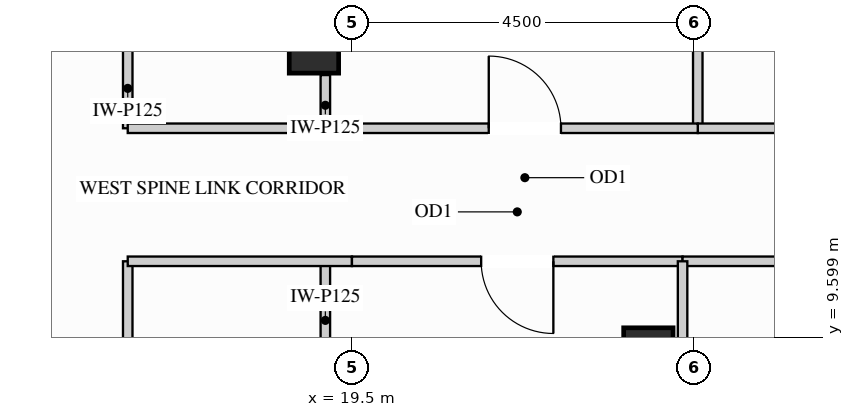
"""IFC4 building model, lengths in metres.
Left out: names, types, materials, properties, quantities, classifications, styles, units other than length and angle.
Written with IfcOpenShell. Run it as: python <this file> out.ifc"""

import sys

from ifc_helpers import new_model, si_unit, direction, frame, frame_2d, origin, origin_2d, place, context, subcontext, project, spatial, rectangle, extrude, source, transform, mapped, element, fill, save


model = new_model("IFC4")
c1 = context("Model", 3, precision=1e-05, world=origin(), true_north=direction((0.0, 1.0)))
c2 = subcontext(c1, "Body", "Model", "MODEL_VIEW")
j1 = project(units=[si_unit("LENGTHUNIT", "METRE"), si_unit("PLANEANGLEUNIT", "RADIAN")], contexts=[c1])
p1 = place(None, origin())
s1 = spatial("IfcSite", under=j1, at=p1, CompositionType="ELEMENT")
p2 = place(p1, origin())
s2 = spatial("IfcBuilding", under=s1, at=p2, CompositionType="ELEMENT")
p3 = place(p2, frame((0.0, 0.0, 219.6)))
s3 = spatial("IfcBuildingStorey", under=s2, at=p3, CompositionType="ELEMENT", Elevation=219.6)
m1 = source(origin(), c2, "Body", "SweptSolid", [
    extrude(rectangle(XDim=0.65, YDim=0.85, at=origin_2d()), origin(), (0.0, 0.0, 1.0), 3.4),
])
for number, where, z_axis, x_axis in (
    (1, (19.0, 13.5, 0.0), (0.0, 0.0, 1.0), (1.0, 0.0, 0.0)),
    (2, (23.4, 9.3, 0.0), (0.0, 0.0, 1.0), (1.0, 0.0, 0.0)),
):
    element("IfcColumn", number, at=place(p3, frame(where, z_axis=z_axis, x_axis=x_axis)), inside=s3, PredefinedType="COLUMN", context=c2, shape_type="MappedRepresentation", body=[
        mapped(m1, transform((0.0, 0.0, 0.0), x_axis=(1.0, 0.0, 0.0), y_axis=(0.0, 1.0, 0.0), z_axis=(0.0, 0.0, 1.0))),
    ])
m2 = source(origin(), c2, "Body", "SweptSolid", [
    extrude(rectangle(XDim=0.7, YDim=0.125, at=frame_2d((0.35, 0.0))), origin(), (0.0, 0.0, 1.0), 2.773),
])
p4 = place(p3, frame((19.15, 12.35, 0.0), z_axis=(0.0, 0.0, 1.0), x_axis=(0.0, 1.0, 0.0)))
e3 = element("IfcWall", 3, at=p4, inside=s3, PredefinedType="PARTITIONING", context=c2, shape_type="MappedRepresentation", body=[
    mapped(m2, transform((0.0, 0.0, 0.0), x_axis=(1.0, 0.0, 0.0), y_axis=(0.0, 1.0, 0.0), z_axis=(0.0, 0.0, 1.0))),
])
m3 = source(origin(), c2, "Body", "SweptSolid", [
    extrude(rectangle(XDim=1.65, YDim=0.125, at=frame_2d((0.825, 0.0))), origin(), (0.0, 0.0, 1.0), 2.773),
])
p5 = place(p3, frame((19.15, 8.95, 0.0), z_axis=(0.0, 0.0, 1.0), x_axis=(0.0, 1.0, 0.0)))
e4 = element("IfcWall", 4, at=p5, inside=s3, PredefinedType="PARTITIONING", context=c2, shape_type="MappedRepresentation", body=[
    mapped(m3, transform((0.0, 0.0, 0.0), x_axis=(1.0, 0.0, 0.0), y_axis=(0.0, 1.0, 0.0), z_axis=(0.0, 0.0, 1.0))),
])
p6 = place(p3, frame((16.55, 12.35, 0.0), z_axis=(0.0, 0.0, 1.0), x_axis=(0.0, 1.0, 0.0)))
e5 = element("IfcWall", 5, at=p6, inside=s3, PredefinedType="PARTITIONING", context=c2, shape_type="SweptSolid", body=[
    extrude(rectangle(XDim=3.25, YDim=0.125, at=frame_2d((1.625, 0.0))), origin(), (0.0, 0.0, 1.0), 3.385),
])
p7 = place(p6, frame((1.15, 0.0, 0.0)))
e6 = element("IfcOpeningElement", 6, at=p7, cuts=e5, PredefinedType="OPENING", context=c2, shape_type="SweptSolid", body=[
    extrude(rectangle(XDim=0.95, YDim=2.15, at=frame_2d((0.475, 1.075))), frame((0.0, 0.073, 0.0), z_axis=(0.0, -1.0, 0.0), x_axis=(1.0, 0.0, 0.0)), (0.0, 0.0, 1.0), 0.145),
])
p8 = place(p3, frame((16.55, 6.2, 0.0), z_axis=(0.0, 0.0, 1.0), x_axis=(0.0, 1.0, 0.0)))
e7 = element("IfcWall", 7, at=p8, inside=s3, PredefinedType="PARTITIONING", context=c2, shape_type="SweptSolid", body=[
    extrude(rectangle(XDim=4.4, YDim=0.125, at=frame_2d((2.2, 0.0))), origin(), (0.0, 0.0, 1.0), 3.385),
])
p9 = place(p8, frame((1.725, 0.0, 0.0)))
e8 = element("IfcOpeningElement", 8, at=p9, cuts=e7, PredefinedType="OPENING", context=c2, shape_type="SweptSolid", body=[
    extrude(rectangle(XDim=0.95, YDim=2.15, at=frame_2d((0.475, 1.075))), frame((0.0, 0.073, 0.0), z_axis=(0.0, -1.0, 0.0), x_axis=(1.0, 0.0, 0.0)), (0.0, 0.0, 1.0), 0.145),
])
m4 = source(origin(), c2, "Body", "SweptSolid", [
    extrude(rectangle(XDim=5.298, YDim=0.125, at=frame_2d((2.649, 0.0))), origin(), (0.0, 0.0, 1.0), 3.385),
])
p10 = place(p3, frame((24.05, 12.35, 0.0), z_axis=(0.0, 0.0, 1.0), x_axis=(0.0, 1.0, 0.0)))
e9 = element("IfcWall", 9, at=p10, inside=s3, PredefinedType="PARTITIONING", context=c2, shape_type="MappedRepresentation", body=[
    mapped(m4, transform((0.0, 0.0, 0.0), x_axis=(1.0, 0.0, 0.0), y_axis=(0.0, 1.0, 0.0), z_axis=(0.0, 0.0, 1.0))),
])
p11 = place(p3, frame((24.05, 12.35, 0.0), z_axis=(0.0, 0.0, 1.0), x_axis=(1.0, 0.0, 0.0)))
e10 = element("IfcWall", 10, at=p11, inside=s3, PredefinedType="PARTITIONING", context=c2, shape_type="SweptSolid", body=[
    extrude(rectangle(XDim=5.8, YDim=0.125, at=frame_2d((2.9, 0.0))), origin(), (0.0, 0.0, 1.0), 3.385),
])
p12 = place(p11, frame((2.425, 0.0, 0.0)))
e11 = element("IfcOpeningElement", 11, at=p12, cuts=e10, PredefinedType="OPENING", context=c2, shape_type="SweptSolid", body=[
    extrude(rectangle(XDim=0.95, YDim=2.15, at=frame_2d((0.475, 1.075))), frame((0.0, 0.073, 0.0), z_axis=(0.0, -1.0, 0.0), x_axis=(1.0, 0.0, 0.0)), (0.0, 0.0, 1.0), 0.145),
])
m5 = source(origin(), c2, "Body", "SweptSolid", [
    extrude(rectangle(XDim=2.95, YDim=0.125, at=frame_2d((1.475, 0.0))), origin(), (0.0, 0.0, 1.0), 3.385),
])
p13 = place(p3, frame((16.55, 12.35, 0.0), z_axis=(0.0, 0.0, 1.0), x_axis=(1.0, 0.0, 0.0)))
e12 = element("IfcWall", 12, at=p13, inside=s3, PredefinedType="PARTITIONING", context=c2, shape_type="MappedRepresentation", body=[
    mapped(m5, transform((0.0, 0.0, 0.0), x_axis=(1.0, 0.0, 0.0), y_axis=(0.0, 1.0, 0.0), z_axis=(0.0, 0.0, 1.0))),
])
p14 = place(p3, frame((19.5, 12.35, 0.0), z_axis=(0.0, 0.0, 1.0), x_axis=(1.0, 0.0, 0.0)))
e13 = element("IfcWall", 13, at=p14, inside=s3, PredefinedType="PARTITIONING", context=c2, shape_type="SweptSolid", body=[
    extrude(rectangle(XDim=4.55, YDim=0.125, at=frame_2d((2.275, 0.0))), origin(), (0.0, 0.0, 1.0), 3.385),
])
p15 = place(p14, frame((1.8, 0.0, 0.0)))
e14 = element("IfcOpeningElement", 14, at=p15, cuts=e13, PredefinedType="OPENING", context=c2, shape_type="SweptSolid", body=[
    extrude(rectangle(XDim=0.95, YDim=2.15, at=frame_2d((0.475, 1.075))), frame((0.0, 0.073, 0.0), z_axis=(0.0, -1.0, 0.0), x_axis=(1.0, 0.0, 0.0)), (0.0, 0.0, 1.0), 0.145),
])
p16 = place(p3, frame((16.55, 10.6, 0.0), z_axis=(0.0, 0.0, 1.0), x_axis=(1.0, 0.0, 0.0)))
e15 = element("IfcWall", 15, at=p16, inside=s3, PredefinedType="PARTITIONING", context=c2, shape_type="MappedRepresentation", body=[
    mapped(m5, transform((0.0, 0.0, 0.0), x_axis=(1.0, 0.0, 0.0), y_axis=(0.0, 1.0, 0.0), z_axis=(0.0, 0.0, 1.0))),
])
p17 = place(p3, frame((19.5, 10.6, 0.0), z_axis=(0.0, 0.0, 1.0), x_axis=(1.0, 0.0, 0.0)))
e16 = element("IfcWall", 16, at=p17, inside=s3, PredefinedType="PARTITIONING", context=c2, shape_type="SweptSolid", body=[
    extrude(rectangle(XDim=4.35, YDim=0.125, at=frame_2d((2.175, 0.0))), origin(), (0.0, 0.0, 1.0), 3.385),
])
p18 = place(p17, frame((1.7, 0.0, 0.0)))
e17 = element("IfcOpeningElement", 17, at=p18, cuts=e16, PredefinedType="OPENING", context=c2, shape_type="SweptSolid", body=[
    extrude(rectangle(XDim=0.95, YDim=2.15, at=frame_2d((0.475, 1.075))), frame((0.0, 0.073, 0.0), z_axis=(0.0, -1.0, 0.0), x_axis=(1.0, 0.0, 0.0)), (0.0, 0.0, 1.0), 0.145),
])
p19 = place(p3, frame((23.85, 10.6, 0.0), z_axis=(0.0, 0.0, 1.0), x_axis=(1.0, 0.0, 0.0)))
e18 = element("IfcWall", 18, at=p19, inside=s3, PredefinedType="PARTITIONING", context=c2, shape_type="SweptSolid", body=[
    extrude(rectangle(XDim=6.0, YDim=0.125, at=frame_2d((3.0, 0.0))), origin(), (0.0, 0.0, 1.0), 3.385),
])
p20 = place(p19, frame((2.525, 0.0, 0.0)))
e19 = element("IfcOpeningElement", 19, at=p20, cuts=e18, PredefinedType="OPENING", context=c2, shape_type="SweptSolid", body=[
    extrude(rectangle(XDim=0.95, YDim=2.15, at=frame_2d((0.475, 1.075))), frame((0.0, 0.073, 0.0), z_axis=(0.0, -1.0, 0.0), x_axis=(1.0, 0.0, 0.0)), (0.0, 0.0, 1.0), 0.145),
])
m6 = source(origin(), c2, "Body", "SweptSolid", [
    extrude(rectangle(XDim=5.748, YDim=0.125, at=frame_2d((2.874, 0.0))), origin(), (0.0, 0.0, 1.0), 3.385),
])
p21 = place(p3, frame((23.85, 4.852, 0.0), z_axis=(0.0, 0.0, 1.0), x_axis=(0.0, 1.0, 0.0)))
e20 = element("IfcWall", 20, at=p21, inside=s3, PredefinedType="PARTITIONING", context=c2, shape_type="MappedRepresentation", body=[
    mapped(m6, transform((0.0, 0.0, 0.0), x_axis=(1.0, 0.0, 0.0), y_axis=(0.0, 1.0, 0.0), z_axis=(0.0, 0.0, 1.0))),
])
m7 = source(origin(), c2, "Body", "SweptSolid", [
    extrude(rectangle(XDim=0.95, YDim=2.15, at=frame_2d((0.475, 1.075))), frame((0.0, 0.025, 0.0), z_axis=(0.0, -1.0, 0.0), x_axis=(1.0, 0.0, 0.0)), (0.0, 0.0, 1.0), 0.05),
])
p22 = place(p15, origin())
e21 = element("IfcDoor", 21, at=p22, inside=s3, OperationType="SINGLE_SWING_LEFT", PredefinedType="DOOR", context=c2, shape_type="MappedRepresentation", body=[
    mapped(m7, transform((0.0, 0.0, 0.0), x_axis=(1.0, 0.0, 0.0), y_axis=(0.0, 1.0, 0.0), z_axis=(0.0, 0.0, 1.0))),
])
fill(e14, e21)
p23 = place(p18, origin())
e22 = element("IfcDoor", 22, at=p23, inside=s3, OperationType="SINGLE_SWING_RIGHT", PredefinedType="DOOR", context=c2, shape_type="MappedRepresentation", body=[
    mapped(m7, transform((0.0, 0.0, 0.0), x_axis=(1.0, 0.0, 0.0), y_axis=(0.0, 1.0, 0.0), z_axis=(0.0, 0.0, 1.0))),
])
fill(e17, e22)
save(model, sys.argv[1])
